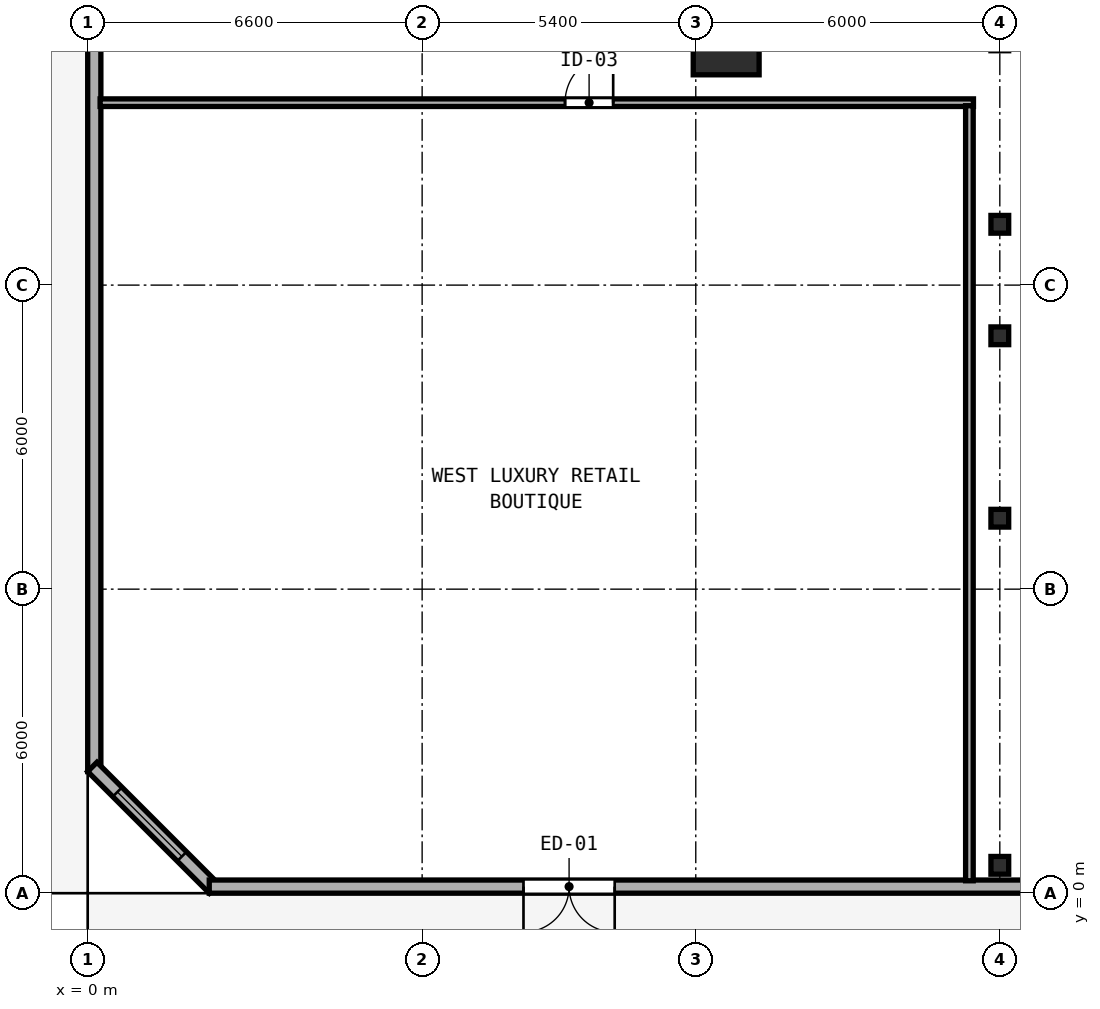
"""IFC4 building model, lengths in metres.
Left out: names, types, materials, properties, quantities, classifications, styles, units other than length and angle.
Written with IfcOpenShell. Run it as: python <this file> out.ifc"""

import sys

from ifc_helpers import new_model, si_unit, direction, frame, frame_2d, origin, origin_2d, place, context, subcontext, project, spatial, rectangle, hollow_rectangle, i_section, extrude, element, fill, save


model = new_model("IFC4")
c1 = context("Model", 3, precision=1e-05, world=origin(), true_north=direction((0.0, 1.0)))
c2 = subcontext(c1, "Body", "Model", "MODEL_VIEW")
j1 = project(units=[si_unit("LENGTHUNIT", "METRE"), si_unit("PLANEANGLEUNIT", "RADIAN")], contexts=[c1])
p1 = place(None, origin())
s1 = spatial("IfcSite", under=j1, at=p1, CompositionType="ELEMENT")
p2 = place(p1, origin())
s2 = spatial("IfcBuilding", under=s1, at=p2, CompositionType="ELEMENT")
p3 = place(p2, origin())
s3 = spatial("IfcBuildingStorey", under=s2, at=p3, CompositionType="ELEMENT", Elevation=0.0)
p4 = place(p3, frame((12.6, 16.8, 0.0), z_axis=(0.0, 0.0, 1.0), x_axis=(1.0, 0.0, 0.0)))
e1 = element("IfcColumn", 1, at=p4, inside=s3, PredefinedType="COLUMN", context=c2, shape_type="SweptSolid", body=[
    extrude(hollow_rectangle(XDim=1.3, YDim=1.3, WallThickness=0.048, at=origin_2d()), origin(), (0.0, 0.0, 1.0), 5.4),
])
for number, where, z_axis, x_axis in (
    (2, (18.0, 0.55, 0.0), (0.0, 0.0, 1.0), (1.0, 0.0, 0.0)),
    (3, (18.0, 7.4, 0.0), (0.0, 0.0, 1.0), (1.0, 0.0, 0.0)),
    (4, (18.0, 11.0, 0.0), (0.0, 0.0, 1.0), (1.0, 0.0, 0.0)),
    (5, (18.0, 13.2, 0.0), (0.0, 0.0, 1.0), (1.0, 0.0, 0.0)),
):
    element("IfcColumn", number, at=place(p3, frame(where, z_axis=z_axis, x_axis=x_axis)), inside=s3, PredefinedType="COLUMN", context=c2, shape_type="SweptSolid", body=[
        extrude(i_section(OverallWidth=0.35, OverallDepth=0.35, WebThickness=0.012, FlangeThickness=0.019, FilletRadius=0.02, at=origin_2d()), origin(), (0.0, 0.0, 1.0), 5.4),
    ])
p5 = place(p3, frame((0.13, 53.925, 0.0), z_axis=(0.0, 0.0, 1.0), x_axis=(0.0, -1.0, 0.0)))
e6 = element("IfcWall", 6, at=p5, inside=s3, PredefinedType="SOLIDWALL", context=c2, shape_type="SweptSolid", body=[
    extrude(rectangle(XDim=51.526, YDim=0.26, at=frame_2d((25.763, 0.0))), origin(), (0.0, 0.0, 1.0), 5.16),
])
p6 = place(p5, frame((23.925, 0.0, 0.0), z_axis=(0.0, 0.0, 1.0), x_axis=(-1.0, 0.0, 0.0)))
e7 = element("IfcOpeningElement", 7, at=p6, cuts=e6, PredefinedType="OPENING", context=c2, shape_type="SweptSolid", body=[
    extrude(rectangle(XDim=1.8, YDim=2.35, at=frame_2d((0.9, 1.175))), frame((0.0, 0.14, 0.0), z_axis=(0.0, -1.0, 0.0), x_axis=(1.0, 0.0, 0.0)), (0.0, 0.0, 1.0), 0.28),
])
p7 = place(p5, frame((16.425, 0.0, 0.0), z_axis=(0.0, 0.0, 1.0), x_axis=(-1.0, 0.0, 0.0)))
e8 = element("IfcOpeningElement", 8, at=p7, cuts=e6, PredefinedType="OPENING", context=c2, shape_type="SweptSolid", body=[
    extrude(rectangle(XDim=4.2, YDim=3.3, at=frame_2d((2.1, 1.65))), frame((0.0, 0.14, 0.0), z_axis=(0.0, -1.0, 0.0), x_axis=(1.0, 0.0, 0.0)), (0.0, 0.0, 1.0), 0.28),
])
p8 = place(p3, frame((0.091, 2.493, 0.0), z_axis=(0.0, 0.0, 1.0), x_axis=(0.707106781187, -0.707106781187, 0.0)))
e9 = element("IfcWall", 9, at=p8, inside=s3, PredefinedType="SOLIDWALL", context=c2, shape_type="SweptSolid", body=[
    extrude(rectangle(XDim=3.396, YDim=0.26, at=frame_2d((1.698, 0.0))), origin(), (0.0, 0.0, 1.0), 5.16),
])
p9 = place(p8, frame((0.7, 0.0, 0.85)))
e10 = element("IfcOpeningElement", 10, at=p9, cuts=e9, PredefinedType="OPENING", context=c2, shape_type="SweptSolid", body=[
    extrude(rectangle(XDim=1.8, YDim=2.2, at=frame_2d((0.9, 1.1))), frame((0.0, 0.14, 0.0), z_axis=(0.0, -1.0, 0.0), x_axis=(1.0, 0.0, 0.0)), (0.0, 0.0, 1.0), 0.28),
])
p10 = place(p3, frame((2.399, 0.13, 0.0), z_axis=(0.0, 0.0, 1.0), x_axis=(1.0, 0.0, 0.0)))
e11 = element("IfcWall", 11, at=p10, inside=s3, PredefinedType="SOLIDWALL", context=c2, shape_type="SweptSolid", body=[
    extrude(rectangle(XDim=72.002, YDim=0.26, at=frame_2d((36.001, 0.0))), origin(), (0.0, 0.0, 1.0), 5.16),
])
p11 = place(p10, frame((26.001, 0.0, 0.0), z_axis=(0.0, 0.0, 1.0), x_axis=(-1.0, 0.0, 0.0)))
e12 = element("IfcOpeningElement", 12, at=p11, cuts=e11, PredefinedType="OPENING", context=c2, shape_type="SweptSolid", body=[
    extrude(rectangle(XDim=1.8, YDim=2.35, at=frame_2d((0.9, 1.175))), frame((0.0, 0.14, 0.0), z_axis=(0.0, -1.0, 0.0), x_axis=(1.0, 0.0, 0.0)), (0.0, 0.0, 1.0), 0.28),
])
p12 = place(p10, frame((36.901, 0.0, 0.0), z_axis=(0.0, 0.0, 1.0), x_axis=(-1.0, 0.0, 0.0)))
e13 = element("IfcOpeningElement", 13, at=p12, cuts=e11, PredefinedType="OPENING", context=c2, shape_type="SweptSolid", body=[
    extrude(rectangle(XDim=1.8, YDim=2.35, at=frame_2d((0.9, 1.175))), frame((0.0, 0.14, 0.0), z_axis=(0.0, -1.0, 0.0), x_axis=(1.0, 0.0, 0.0)), (0.0, 0.0, 1.0), 0.28),
])
p13 = place(p10, frame((47.801, 0.0, 0.0), z_axis=(0.0, 0.0, 1.0), x_axis=(-1.0, 0.0, 0.0)))
e14 = element("IfcOpeningElement", 14, at=p13, cuts=e11, PredefinedType="OPENING", context=c2, shape_type="SweptSolid", body=[
    extrude(rectangle(XDim=1.8, YDim=2.35, at=frame_2d((0.9, 1.175))), frame((0.0, 0.14, 0.0), z_axis=(0.0, -1.0, 0.0), x_axis=(1.0, 0.0, 0.0)), (0.0, 0.0, 1.0), 0.28),
])
p14 = place(p10, frame((8.001, 0.0, 0.0), z_axis=(0.0, 0.0, 1.0), x_axis=(-1.0, 0.0, 0.0)))
e15 = element("IfcOpeningElement", 15, at=p14, cuts=e11, PredefinedType="OPENING", context=c2, shape_type="SweptSolid", body=[
    extrude(rectangle(XDim=1.8, YDim=2.35, at=frame_2d((0.9, 1.175))), frame((0.0, 0.14, 0.0), z_axis=(0.0, -1.0, 0.0), x_axis=(1.0, 0.0, 0.0)), (0.0, 0.0, 1.0), 0.28),
])
p15 = place(p10, frame((62.501, 0.0, 0.0), z_axis=(0.0, 0.0, 1.0), x_axis=(-1.0, 0.0, 0.0)))
e16 = element("IfcOpeningElement", 16, at=p15, cuts=e11, PredefinedType="OPENING", context=c2, shape_type="SweptSolid", body=[
    extrude(rectangle(XDim=1.8, YDim=2.35, at=frame_2d((0.9, 1.175))), frame((0.0, 0.14, 0.0), z_axis=(0.0, -1.0, 0.0), x_axis=(1.0, 0.0, 0.0)), (0.0, 0.0, 1.0), 0.28),
])
p16 = place(p3, frame((0.245, 15.6, 0.0), z_axis=(0.0, 0.0, 1.0), x_axis=(1.0, 0.0, 0.0)))
e17 = element("IfcWall", 17, at=p16, inside=s3, PredefinedType="PARTITIONING", context=c2, shape_type="SweptSolid", body=[
    extrude(rectangle(XDim=17.235, YDim=0.15, at=frame_2d((8.617, 0.0))), origin(), (0.0, 0.0, 1.0), 5.16),
])
p17 = place(p16, frame((10.125, 0.0, 0.0), z_axis=(0.0, 0.0, 1.0), x_axis=(-1.0, 0.0, 0.0)))
e18 = element("IfcOpeningElement", 18, at=p17, cuts=e17, PredefinedType="OPENING", context=c2, shape_type="SweptSolid", body=[
    extrude(rectangle(XDim=0.95, YDim=2.12, at=frame_2d((0.475, 1.06))), frame((0.0, 0.085, 0.0), z_axis=(0.0, -1.0, 0.0), x_axis=(1.0, 0.0, 0.0)), (0.0, 0.0, 1.0), 0.17),
])
p18 = place(p3, frame((17.4, 0.245, 0.0), z_axis=(0.0, 0.0, 1.0), x_axis=(0.0, 1.0, 0.0)))
e19 = element("IfcWall", 19, at=p18, inside=s3, PredefinedType="PARTITIONING", context=c2, shape_type="SweptSolid", body=[
    extrude(rectangle(XDim=15.295, YDim=0.15, at=frame_2d((7.647, 0.0))), origin(), (0.0, 0.0, 1.0), 5.16),
])
p19 = place(p9, origin())
e20 = element("IfcWindow", 20, at=p19, inside=s3, PartitioningType="SINGLE_PANEL", PredefinedType="WINDOW", context=c2, shape_type="SweptSolid", body=[
    extrude(rectangle(XDim=1.8, YDim=2.2, at=frame_2d((0.9, 1.1))), frame((0.0, 0.03, 0.0), z_axis=(0.0, -1.0, 0.0), x_axis=(1.0, 0.0, 0.0)), (0.0, 0.0, 1.0), 0.06),
])
fill(e10, e20)
p20 = place(p14, origin())
e21 = element("IfcDoor", 21, at=p20, inside=s3, OperationType="DOUBLE_DOOR_SINGLE_SWING", PredefinedType="DOOR", context=c2, shape_type="SweptSolid", body=[
    extrude(rectangle(XDim=1.8, YDim=2.35, at=frame_2d((0.9, 1.175))), frame((0.0, 0.025, 0.0), z_axis=(0.0, -1.0, 0.0), x_axis=(1.0, 0.0, 0.0)), (0.0, 0.0, 1.0), 0.05),
])
fill(e15, e21)
p21 = place(p17, origin())
e22 = element("IfcDoor", 22, at=p21, inside=s3, OperationType="SINGLE_SWING_LEFT", PredefinedType="DOOR", context=c2, shape_type="SweptSolid", body=[
    extrude(rectangle(XDim=0.95, YDim=2.12, at=frame_2d((0.475, 1.06))), frame((0.0, 0.025, 0.0), z_axis=(0.0, -1.0, 0.0), x_axis=(1.0, 0.0, 0.0)), (0.0, 0.0, 1.0), 0.05),
])
fill(e18, e22)
save(model, sys.argv[1])
